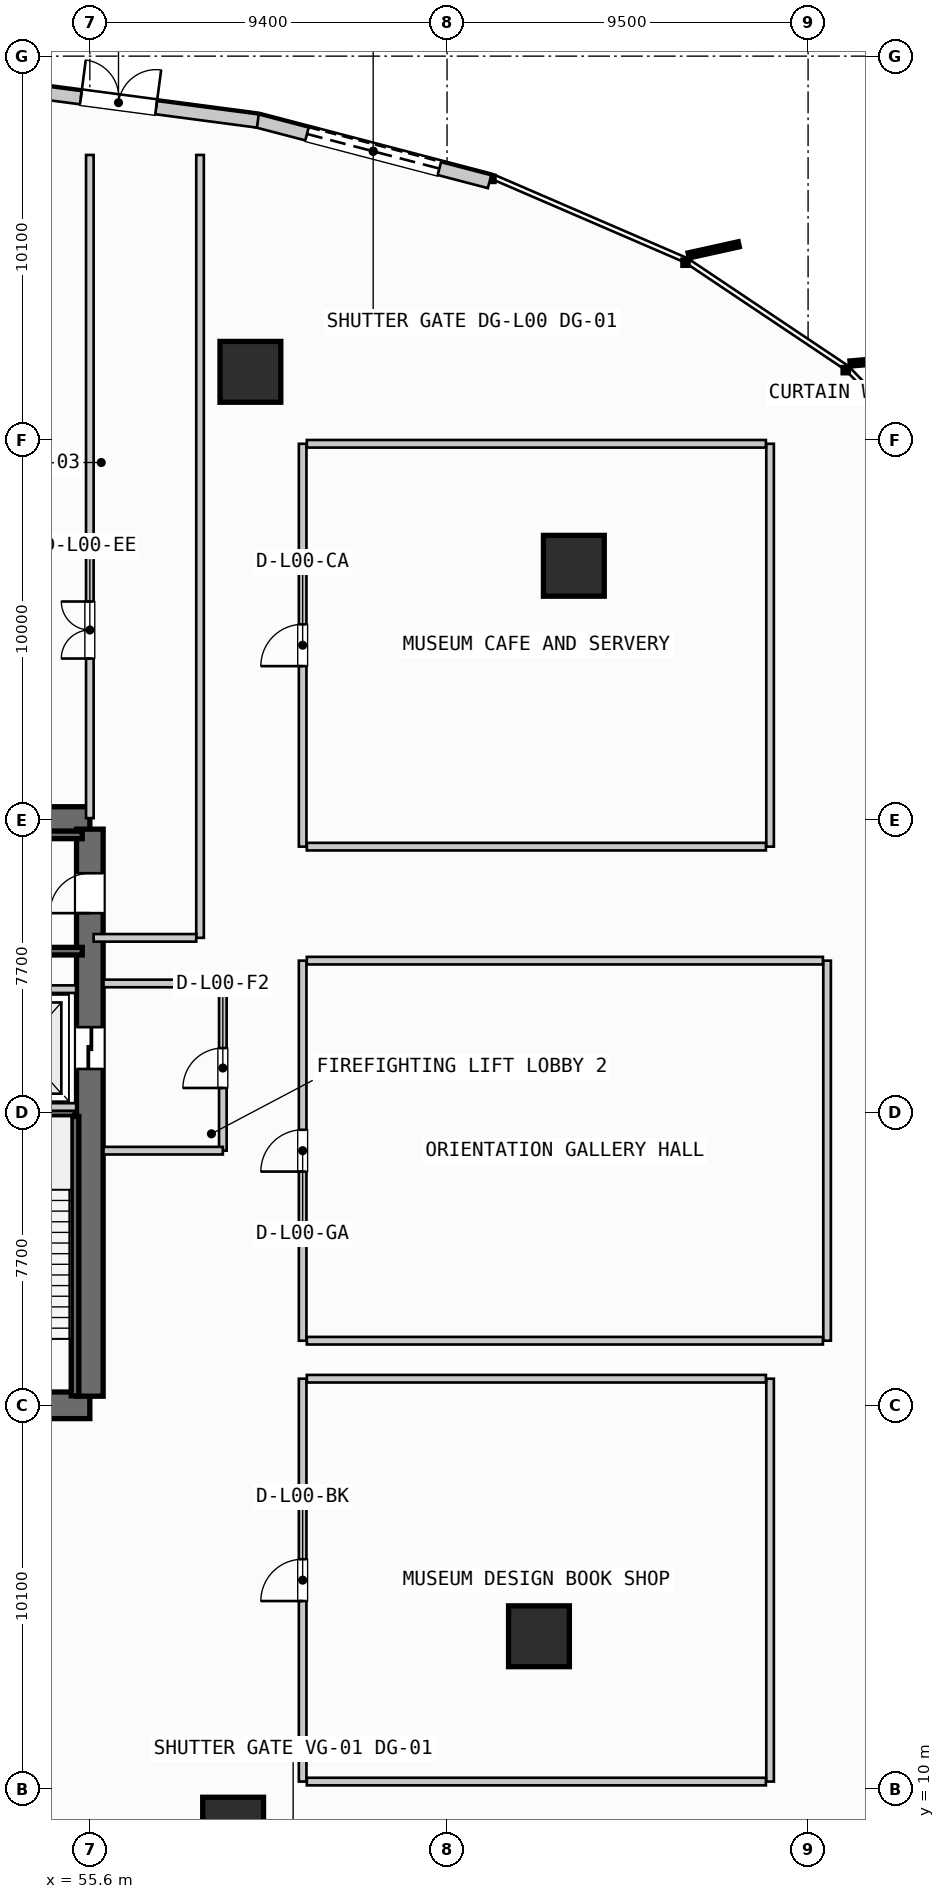
"""IFC4 building model, lengths in metres.
Left out: names, types, materials, properties, quantities, classifications, styles, units other than length and angle.
Written with IfcOpenShell. Run it as: python <this file> out.ifc"""

import sys

from ifc_helpers import new_model, si_unit, direction, frame, frame_2d, origin, origin_2d, place, context, subcontext, project, spatial, rectangle, hollow_rectangle, extrude, source, transform, mapped, element, fill, save


model = new_model("IFC4")
c1 = context("Model", 3, precision=1e-05, world=origin(), true_north=direction((0.0, 1.0)))
c2 = subcontext(c1, "Body", "Model", "MODEL_VIEW")
j1 = project(units=[si_unit("LENGTHUNIT", "METRE"), si_unit("PLANEANGLEUNIT", "RADIAN")], contexts=[c1])
p1 = place(None, origin())
s1 = spatial("IfcSite", under=j1, at=p1, CompositionType="ELEMENT")
p2 = place(p1, origin())
s2 = spatial("IfcBuilding", under=s1, at=p2, CompositionType="ELEMENT")
p3 = place(p2, origin())
s3 = spatial("IfcBuildingStorey", under=s2, at=p3, CompositionType="ELEMENT", Elevation=0.0)
p4 = place(p3, frame((38.0, 20.1, 0.0), z_axis=(0.0, 0.0, 1.0), x_axis=(1.0, 0.0, 0.0)))
e1 = element("IfcWall", 1, at=p4, inside=s3, PredefinedType="SHEAR", context=c2, shape_type="SweptSolid", body=[
    extrude(rectangle(XDim=17.6, YDim=0.7, at=frame_2d((8.8, 0.0))), origin(), (0.0, 0.0, 1.0), 4.95),
])
p5 = place(p4, frame((1.4, 0.0, 0.0)))
e2 = element("IfcOpeningElement", 2, at=p5, cuts=e1, PredefinedType="OPENING", context=c2, shape_type="SweptSolid", body=[
    extrude(rectangle(XDim=1.05, YDim=2.15, at=frame_2d((0.525, 1.075))), frame((0.0, 0.36, 0.0), z_axis=(0.0, -1.0, 0.0), x_axis=(1.0, 0.0, 0.0)), (0.0, 0.0, 1.0), 0.72),
])
p6 = place(p4, frame((15.15, 0.0, 0.0)))
e3 = element("IfcOpeningElement", 3, at=p6, cuts=e1, PredefinedType="OPENING", context=c2, shape_type="SweptSolid", body=[
    extrude(rectangle(XDim=1.05, YDim=2.15, at=frame_2d((0.525, 1.075))), frame((0.0, 0.36, 0.0), z_axis=(0.0, -1.0, 0.0), x_axis=(1.0, 0.0, 0.0)), (0.0, 0.0, 1.0), 0.72),
])
p7 = place(p3, frame((55.6, 35.5, 0.0), z_axis=(0.0, 0.0, 1.0), x_axis=(-1.0, 0.0, 0.0)))
e4 = element("IfcWall", 4, at=p7, inside=s3, PredefinedType="SHEAR", context=c2, shape_type="SweptSolid", body=[
    extrude(rectangle(XDim=17.6, YDim=0.7, at=frame_2d((8.8, 0.0))), origin(), (0.0, 0.0, 1.0), 4.95),
])
p8 = place(p7, frame((8.05, 0.0, 0.0)))
e5 = element("IfcOpeningElement", 5, at=p8, cuts=e4, PredefinedType="OPENING", context=c2, shape_type="SweptSolid", body=[
    extrude(rectangle(XDim=1.5, YDim=2.2, at=frame_2d((0.75, 1.1))), frame((0.0, 0.36, 0.0), z_axis=(0.0, -1.0, 0.0), x_axis=(1.0, 0.0, 0.0)), (0.0, 0.0, 1.0), 0.72),
])
p9 = place(p7, frame((14.95, 0.0, 0.0)))
e6 = element("IfcOpeningElement", 6, at=p9, cuts=e4, PredefinedType="OPENING", context=c2, shape_type="SweptSolid", body=[
    extrude(rectangle(XDim=1.4, YDim=2.3, at=frame_2d((0.7, 1.15))), frame((0.0, 0.36, 0.0), z_axis=(0.0, -1.0, 0.0), x_axis=(1.0, 0.0, 0.0)), (0.0, 0.0, 1.0), 0.72),
])
p10 = place(p7, frame((12.3, 0.0, 0.0)))
e7 = element("IfcOpeningElement", 7, at=p10, cuts=e4, PredefinedType="OPENING", context=c2, shape_type="SweptSolid", body=[
    extrude(rectangle(XDim=0.95, YDim=2.15, at=frame_2d((0.475, 1.075))), frame((0.0, 0.36, 0.0), z_axis=(0.0, -1.0, 0.0), x_axis=(1.0, 0.0, 0.0)), (0.0, 0.0, 1.0), 0.72),
])
p11 = place(p7, frame((10.2, 0.0, 0.0)))
e8 = element("IfcOpeningElement", 8, at=p11, cuts=e4, PredefinedType="OPENING", context=c2, shape_type="SweptSolid", body=[
    extrude(rectangle(XDim=0.9, YDim=2.15, at=frame_2d((0.45, 1.075))), frame((0.0, 0.36, 0.0), z_axis=(0.0, -1.0, 0.0), x_axis=(1.0, 0.0, 0.0)), (0.0, 0.0, 1.0), 0.72),
])
p12 = place(p3, frame((55.6, 20.34, 0.0), z_axis=(0.0, 0.0, 1.0), x_axis=(0.0, 1.0, 0.0)))
e9 = element("IfcWall", 9, at=p12, inside=s3, PredefinedType="SHEAR", context=c2, shape_type="SweptSolid", body=[
    extrude(rectangle(XDim=14.92, YDim=0.7, at=frame_2d((7.46, 0.0))), origin(), (0.0, 0.0, 1.0), 4.95),
])
p13 = place(p12, frame((12.71, 0.0, 0.0)))
e10 = element("IfcOpeningElement", 10, at=p13, cuts=e9, PredefinedType="OPENING", context=c2, shape_type="SweptSolid", body=[
    extrude(rectangle(XDim=1.05, YDim=2.15, at=frame_2d((0.525, 1.075))), frame((0.0, 0.36, 0.0), z_axis=(0.0, -1.0, 0.0), x_axis=(1.0, 0.0, 0.0)), (0.0, 0.0, 1.0), 0.72),
])
p14 = place(p12, frame((8.61, 0.0, 0.0)))
e11 = element("IfcOpeningElement", 11, at=p14, cuts=e9, PredefinedType="OPENING", context=c2, shape_type="SweptSolid", body=[
    extrude(rectangle(XDim=1.1, YDim=2.2, at=frame_2d((0.55, 1.1))), frame((0.0, 0.36, 0.0), z_axis=(0.0, -1.0, 0.0), x_axis=(1.0, 0.0, 0.0)), (0.0, 0.0, 1.0), 0.72),
])
m1 = source(origin(), c2, "Body", "SweptSolid", [
    extrude(hollow_rectangle(XDim=1.6, YDim=1.6, WallThickness=0.06, InnerFilletRadius=0.03, OuterFilletRadius=0.09, at=origin_2d()), origin(), (0.0, 0.0, 1.0), 4.95),
])
for number, where, z_axis, x_axis in (
    (12, (68.336, 42.19, 0.0), (0.0, 0.0, 1.0), (1.0, 0.0, 0.0)),
    (13, (59.825, 47.293, 0.0), (0.0, 0.0, 1.0), (1.0, 0.0, 0.0)),
    (14, (59.37, 8.987, 0.0), (0.0, 0.0, 1.0), (1.0, 0.0, 0.0)),
    (15, (67.418, 14.023, 0.0), (0.0, 0.0, 1.0), (1.0, 0.0, 0.0)),
):
    element("IfcColumn", number, at=place(p3, frame(where, z_axis=z_axis, x_axis=x_axis)), inside=s3, PredefinedType="COLUMN", context=c2, shape_type="MappedRepresentation", body=[
        mapped(m1, transform((0.0, 0.0, 0.0), scale=1.0)),
    ])
p15 = place(p3, frame((59.994, 53.898, 0.0), z_axis=(0.0, 0.0, 1.0), x_axis=(0.967458151093, -0.253031076914, 0.0)))
e16 = element("IfcWall", 16, at=p15, inside=s3, PredefinedType="SOLIDWALL", context=c2, shape_type="SweptSolid", body=[
    extrude(rectangle(XDim=6.33, YDim=0.35, at=frame_2d((3.165, 0.0))), origin(), (0.0, 0.0, 1.0), 4.95),
])
p16 = place(p15, frame((1.365, 0.0, 0.0)))
e17 = element("IfcOpeningElement", 17, at=p16, cuts=e16, PredefinedType="OPENING", context=c2, shape_type="SweptSolid", body=[
    extrude(rectangle(XDim=3.6, YDim=3.8, at=frame_2d((1.8, 1.9))), frame((0.0, 0.185, 0.0), z_axis=(0.0, -1.0, 0.0), x_axis=(1.0, 0.0, 0.0)), (0.0, 0.0, 1.0), 0.37),
])
p17 = place(p3, frame((52.687, 54.859, 0.0), z_axis=(0.0, 0.0, 1.0), x_axis=(0.991427089323, -0.130661113403, 0.0)))
e18 = element("IfcWall", 18, at=p17, inside=s3, PredefinedType="SOLIDWALL", context=c2, shape_type="SweptSolid", body=[
    extrude(rectangle(XDim=7.397, YDim=0.35, at=frame_2d((3.699, 0.0))), origin(), (0.0, 0.0, 1.0), 4.95),
])
p18 = place(p17, frame((2.699, 0.0, 0.0)))
e19 = element("IfcOpeningElement", 19, at=p18, cuts=e18, PredefinedType="OPENING", context=c2, shape_type="SweptSolid", body=[
    extrude(rectangle(XDim=2.0, YDim=2.4, at=frame_2d((1.0, 1.2))), frame((0.0, 0.185, 0.0), z_axis=(0.0, -1.0, 0.0), x_axis=(1.0, 0.0, 0.0)), (0.0, 0.0, 1.0), 0.37),
])
p19 = place(p3, frame((52.15, 27.8, 0.0), z_axis=(0.0, 0.0, 1.0), x_axis=(1.0, 0.0, 0.0)))
e20 = element("IfcWall", 20, at=p19, inside=s3, PredefinedType="SHEAR", context=c2, shape_type="SweptSolid", body=[
    extrude(rectangle(XDim=3.06, YDim=0.2, at=frame_2d((1.53, 0.0))), origin(), (0.0, 0.0, 1.0), 4.95),
])
for number, where, z_axis, x_axis in (
    (21, (55.21, 27.7, 0.0), (0.0, 0.0, 1.0), (0.0, -1.0, 0.0)),
    (22, (48.05, 35.11, 0.0), (0.0, 0.0, 1.0), (1.0, 0.0, 0.0)),
    (23, (55.4, 32.05, 0.0), (0.0, 0.0, 1.0), (-1.0, 0.0, 0.0)),
):
    element("IfcWall", number, at=place(p3, frame(where, z_axis=z_axis, x_axis=x_axis)), inside=s3, PredefinedType="SHEAR", context=c2, shape_type="SweptSolid", body=[
        extrude(rectangle(XDim=7.35, YDim=0.2, at=frame_2d((3.675, 0.0))), origin(), (0.0, 0.0, 1.0), 4.95),
    ])
for number, where, z_axis, x_axis in (
    (24, (52.45, 27.95, 0.0), (0.0, 0.0, 1.0), (1.0, 0.0, 0.0)),
    (25, (52.45, 31.05, 0.0), (0.0, 0.0, 1.0), (1.0, 0.0, 0.0)),
):
    element("IfcWall", number, at=place(p3, frame(where, z_axis=z_axis, x_axis=x_axis)), inside=s3, PredefinedType="PARTITIONING", context=c2, shape_type="SweptSolid", body=[
        extrude(rectangle(XDim=2.79, YDim=0.2, at=frame_2d((1.395, 0.0))), origin(), (0.0, 0.0, 1.0), 4.163),
    ])
p20 = place(p3, frame((59.1, 26.8, 0.0), z_axis=(0.0, 0.0, 1.0), x_axis=(0.0, 1.0, 0.0)))
e26 = element("IfcWall", 26, at=p20, inside=s3, PredefinedType="PARTITIONING", context=c2, shape_type="SweptSolid", body=[
    extrude(rectangle(XDim=4.4, YDim=0.2, at=frame_2d((2.2, 0.0))), origin(), (0.0, 0.0, 1.0), 4.163),
])
p21 = place(p20, frame((1.65, 0.0, 0.0)))
e27 = element("IfcOpeningElement", 27, at=p21, cuts=e26, PredefinedType="OPENING", context=c2, shape_type="SweptSolid", body=[
    extrude(rectangle(XDim=1.05, YDim=2.15, at=frame_2d((0.525, 1.075))), frame((0.0, 0.11, 0.0), z_axis=(0.0, -1.0, 0.0), x_axis=(1.0, 0.0, 0.0)), (0.0, 0.0, 1.0), 0.22),
])
for number, where, z_axis, x_axis in (
    (28, (55.96, 26.8, 0.0), (0.0, 0.0, 1.0), (1.0, 0.0, 0.0)),
    (29, (55.96, 31.2, 0.0), (0.0, 0.0, 1.0), (1.0, 0.0, 0.0)),
):
    element("IfcWall", number, at=place(p3, frame(where, z_axis=z_axis, x_axis=x_axis)), inside=s3, PredefinedType="PARTITIONING", context=c2, shape_type="SweptSolid", body=[
        extrude(rectangle(XDim=3.14, YDim=0.2, at=frame_2d((1.57, 0.0))), origin(), (0.0, 0.0, 1.0), 4.163),
    ])
p22 = place(p3, frame((61.2, 10.2, 0.0), z_axis=(0.0, 0.0, 1.0), x_axis=(0.0, 1.0, 0.0)))
e30 = element("IfcWall", 30, at=p22, inside=s3, PredefinedType="PARTITIONING", context=c2, shape_type="SweptSolid", body=[
    extrude(rectangle(XDim=10.6, YDim=0.2, at=frame_2d((5.3, 0.0))), origin(), (0.0, 0.0, 1.0), 4.163),
])
p23 = place(p22, frame((4.75, 0.0, 0.0)))
e31 = element("IfcOpeningElement", 31, at=p23, cuts=e30, PredefinedType="OPENING", context=c2, shape_type="SweptSolid", body=[
    extrude(rectangle(XDim=1.1, YDim=2.15, at=frame_2d((0.55, 1.075))), frame((0.0, 0.11, 0.0), z_axis=(0.0, -1.0, 0.0), x_axis=(1.0, 0.0, 0.0)), (0.0, 0.0, 1.0), 0.22),
])
p24 = place(p3, frame((73.5, 10.2, 0.0), z_axis=(0.0, 0.0, 1.0), x_axis=(0.0, 1.0, 0.0)))
e32 = element("IfcWall", 32, at=p24, inside=s3, PredefinedType="PARTITIONING", context=c2, shape_type="SweptSolid", body=[
    extrude(rectangle(XDim=10.6, YDim=0.2, at=frame_2d((5.3, 0.0))), origin(), (0.0, 0.0, 1.0), 4.163),
])
for number, where, z_axis, x_axis in (
    (33, (61.31, 10.2, 0.0), (0.0, 0.0, 1.0), (1.0, 0.0, 0.0)),
    (34, (61.31, 20.8, 0.0), (0.0, 0.0, 1.0), (1.0, 0.0, 0.0)),
):
    element("IfcWall", number, at=place(p3, frame(where, z_axis=z_axis, x_axis=x_axis)), inside=s3, PredefinedType="PARTITIONING", context=c2, shape_type="SweptSolid", body=[
        extrude(rectangle(XDim=12.08, YDim=0.2, at=frame_2d((6.04, 0.0))), origin(), (0.0, 0.0, 1.0), 4.163),
    ])
p25 = place(p3, frame((61.2, 34.8, 0.0), z_axis=(0.0, 0.0, 1.0), x_axis=(0.0, 1.0, 0.0)))
e35 = element("IfcWall", 35, at=p25, inside=s3, PredefinedType="PARTITIONING", context=c2, shape_type="SweptSolid", body=[
    extrude(rectangle(XDim=10.6, YDim=0.2, at=frame_2d((5.3, 0.0))), origin(), (0.0, 0.0, 1.0), 4.163),
])
p26 = place(p25, frame((4.75, 0.0, 0.0)))
e36 = element("IfcOpeningElement", 36, at=p26, cuts=e35, PredefinedType="OPENING", context=c2, shape_type="SweptSolid", body=[
    extrude(rectangle(XDim=1.1, YDim=2.15, at=frame_2d((0.55, 1.075))), frame((0.0, 0.11, 0.0), z_axis=(0.0, -1.0, 0.0), x_axis=(1.0, 0.0, 0.0)), (0.0, 0.0, 1.0), 0.22),
])
p27 = place(p3, frame((73.5, 34.8, 0.0), z_axis=(0.0, 0.0, 1.0), x_axis=(0.0, 1.0, 0.0)))
e37 = element("IfcWall", 37, at=p27, inside=s3, PredefinedType="PARTITIONING", context=c2, shape_type="SweptSolid", body=[
    extrude(rectangle(XDim=10.6, YDim=0.2, at=frame_2d((5.3, 0.0))), origin(), (0.0, 0.0, 1.0), 3.405),
])
p28 = place(p3, frame((61.31, 34.8, 0.0), z_axis=(0.0, 0.0, 1.0), x_axis=(1.0, 0.0, 0.0)))
e38 = element("IfcWall", 38, at=p28, inside=s3, PredefinedType="PARTITIONING", context=c2, shape_type="SweptSolid", body=[
    extrude(rectangle(XDim=12.08, YDim=0.2, at=frame_2d((6.04, 0.0))), origin(), (0.0, 0.0, 1.0), 4.163),
])
p29 = place(p3, frame((61.31, 45.4, 0.0), z_axis=(0.0, 0.0, 1.0), x_axis=(1.0, 0.0, 0.0)))
e39 = element("IfcWall", 39, at=p29, inside=s3, PredefinedType="PARTITIONING", context=c2, shape_type="SweptSolid", body=[
    extrude(rectangle(XDim=12.08, YDim=0.2, at=frame_2d((6.04, 0.0))), origin(), (0.0, 0.0, 1.0), 3.405),
])
p30 = place(p3, frame((61.2, 21.8, 0.0), z_axis=(0.0, 0.0, 1.0), x_axis=(0.0, 1.0, 0.0)))
e40 = element("IfcWall", 40, at=p30, inside=s3, PredefinedType="PARTITIONING", context=c2, shape_type="SweptSolid", body=[
    extrude(rectangle(XDim=10.0, YDim=0.2, at=frame_2d((5.0, 0.0))), origin(), (0.0, 0.0, 1.0), 4.163),
])
p31 = place(p30, frame((4.45, 0.0, 0.0)))
e41 = element("IfcOpeningElement", 41, at=p31, cuts=e40, PredefinedType="OPENING", context=c2, shape_type="SweptSolid", body=[
    extrude(rectangle(XDim=1.1, YDim=2.15, at=frame_2d((0.55, 1.075))), frame((0.0, 0.11, 0.0), z_axis=(0.0, -1.0, 0.0), x_axis=(1.0, 0.0, 0.0)), (0.0, 0.0, 1.0), 0.22),
])
p32 = place(p3, frame((75.0, 21.8, 0.0), z_axis=(0.0, 0.0, 1.0), x_axis=(0.0, 1.0, 0.0)))
e42 = element("IfcWall", 42, at=p32, inside=s3, PredefinedType="PARTITIONING", context=c2, shape_type="SweptSolid", body=[
    extrude(rectangle(XDim=10.0, YDim=0.2, at=frame_2d((5.0, 0.0))), origin(), (0.0, 0.0, 1.0), 4.163),
])
for number, where, z_axis, x_axis in (
    (43, (61.31, 21.8, 0.0), (0.0, 0.0, 1.0), (1.0, 0.0, 0.0)),
    (44, (61.31, 31.8, 0.0), (0.0, 0.0, 1.0), (1.0, 0.0, 0.0)),
):
    element("IfcWall", number, at=place(p3, frame(where, z_axis=z_axis, x_axis=x_axis)), inside=s3, PredefinedType="PARTITIONING", context=c2, shape_type="SweptSolid", body=[
        extrude(rectangle(XDim=13.58, YDim=0.2, at=frame_2d((6.79, 0.0))), origin(), (0.0, 0.0, 1.0), 4.163),
    ])
p33 = place(p3, frame((58.5, 32.4, 0.0), z_axis=(0.0, 0.0, 1.0), x_axis=(0.0, 1.0, 0.0)))
e45 = element("IfcWall", 45, at=p33, inside=s3, PredefinedType="PARTITIONING", context=c2, shape_type="SweptSolid", body=[
    extrude(rectangle(XDim=20.6, YDim=0.2, at=frame_2d((10.3, 0.0))), origin(), (0.0, 0.0, 1.0), 3.405),
])
p34 = place(p3, frame((55.7, 32.4, 0.0), z_axis=(0.0, 0.0, 1.0), x_axis=(1.0, 0.0, 0.0)))
e46 = element("IfcWall", 46, at=p34, inside=s3, PredefinedType="PARTITIONING", context=c2, shape_type="SweptSolid", body=[
    extrude(rectangle(XDim=2.7, YDim=0.2, at=frame_2d((1.35, 0.0))), origin(), (0.0, 0.0, 1.0), 4.163),
])
p35 = place(p3, frame((55.6, 35.55, 0.0), z_axis=(0.0, 0.0, 1.0), x_axis=(0.0, 1.0, 0.0)))
e47 = element("IfcWall", 47, at=p35, inside=s3, PredefinedType="PARTITIONING", context=c2, shape_type="SweptSolid", body=[
    extrude(rectangle(XDim=17.45, YDim=0.2, at=frame_2d((8.725, 0.0))), origin(), (0.0, 0.0, 1.0), 3.405),
])
p36 = place(p35, frame((4.2, 0.0, 0.0)))
e48 = element("IfcOpeningElement", 48, at=p36, cuts=e47, PredefinedType="OPENING", context=c2, shape_type="SweptSolid", body=[
    extrude(rectangle(XDim=1.5, YDim=2.2, at=frame_2d((0.75, 1.1))), frame((0.0, 0.11, 0.0), z_axis=(0.0, -1.0, 0.0), x_axis=(1.0, 0.0, 0.0)), (0.0, 0.0, 1.0), 0.22),
])
m2 = source(origin(), c2, "Body", "SweptSolid", [
    extrude(rectangle(XDim=3.6, YDim=3.8, at=frame_2d((1.8, 1.9))), frame((0.0, 0.025, 0.0), z_axis=(0.0, -1.0, 0.0), x_axis=(1.0, 0.0, 0.0)), (0.0, 0.0, 1.0), 0.05),
])
p37 = place(p16, origin())
e49 = element("IfcDoor", 49, at=p37, inside=s3, OperationType="ROLLINGUP", PredefinedType="GATE", context=c2, shape_type="MappedRepresentation", body=[
    mapped(m2, transform((0.0, 0.0, 0.0), scale=1.0)),
])
fill(e17, e49)
m3 = source(origin(), c2, "Body", "SweptSolid", [
    extrude(rectangle(XDim=2.0, YDim=2.4, at=frame_2d((1.0, 1.2))), frame((0.0, 0.025, 0.0), z_axis=(0.0, -1.0, 0.0), x_axis=(1.0, 0.0, 0.0)), (0.0, 0.0, 1.0), 0.05),
])
p38 = place(p18, origin())
e50 = element("IfcDoor", 50, at=p38, inside=s3, OperationType="DOUBLE_DOOR_SINGLE_SWING", PredefinedType="DOOR", context=c2, shape_type="MappedRepresentation", body=[
    mapped(m3, transform((0.0, 0.0, 0.0), scale=1.0)),
])
fill(e19, e50)
m4 = source(origin(), c2, "Body", "SweptSolid", [
    extrude(rectangle(XDim=1.05, YDim=2.15, at=frame_2d((0.525, 1.075))), frame((0.0, 0.025, 0.0), z_axis=(0.0, -1.0, 0.0), x_axis=(1.0, 0.0, 0.0)), (0.0, 0.0, 1.0), 0.05),
])
p39 = place(p13, origin())
e51 = element("IfcDoor", 51, at=p39, inside=s3, OperationType="SINGLE_SWING_LEFT", PredefinedType="DOOR", context=c2, shape_type="MappedRepresentation", body=[
    mapped(m4, transform((0.0, 0.0, 0.0), scale=1.0)),
])
fill(e10, e51)
m5 = source(origin(), c2, "Body", "SweptSolid", [
    extrude(rectangle(XDim=1.1, YDim=2.2, at=frame_2d((0.55, 1.1))), frame((0.0, 0.025, 0.0), z_axis=(0.0, -1.0, 0.0), x_axis=(1.0, 0.0, 0.0)), (0.0, 0.0, 1.0), 0.05),
])
p40 = place(p14, origin())
e52 = element("IfcDoor", 52, at=p40, inside=s3, OperationType="SLIDING_TO_RIGHT", PredefinedType="DOOR", context=c2, shape_type="MappedRepresentation", body=[
    mapped(m5, transform((0.0, 0.0, 0.0), scale=1.0)),
])
fill(e11, e52)
p41 = place(p21, origin())
e53 = element("IfcDoor", 53, at=p41, inside=s3, OperationType="SINGLE_SWING_LEFT", PredefinedType="DOOR", context=c2, shape_type="MappedRepresentation", body=[
    mapped(m4, transform((0.0, 0.0, 0.0), scale=1.0)),
])
fill(e27, e53)
m6 = source(origin(), c2, "Body", "SweptSolid", [
    extrude(rectangle(XDim=1.1, YDim=2.15, at=frame_2d((0.55, 1.075))), frame((0.0, 0.025, 0.0), z_axis=(0.0, -1.0, 0.0), x_axis=(1.0, 0.0, 0.0)), (0.0, 0.0, 1.0), 0.05),
])
p42 = place(p23, origin())
e54 = element("IfcDoor", 54, at=p42, inside=s3, OperationType="SINGLE_SWING_LEFT", PredefinedType="DOOR", context=c2, shape_type="MappedRepresentation", body=[
    mapped(m6, transform((0.0, 0.0, 0.0), scale=1.0)),
])
fill(e31, e54)
p43 = place(p26, origin())
e55 = element("IfcDoor", 55, at=p43, inside=s3, OperationType="SINGLE_SWING_LEFT", PredefinedType="DOOR", context=c2, shape_type="MappedRepresentation", body=[
    mapped(m6, transform((0.0, 0.0, 0.0), scale=1.0)),
])
fill(e36, e55)
p44 = place(p31, origin())
e56 = element("IfcDoor", 56, at=p44, inside=s3, OperationType="SINGLE_SWING_LEFT", PredefinedType="DOOR", context=c2, shape_type="MappedRepresentation", body=[
    mapped(m6, transform((0.0, 0.0, 0.0), scale=1.0)),
])
fill(e41, e56)
m7 = source(origin(), c2, "Body", "SweptSolid", [
    extrude(rectangle(XDim=1.5, YDim=2.2, at=frame_2d((0.75, 1.1))), frame((0.0, 0.025, 0.0), z_axis=(0.0, -1.0, 0.0), x_axis=(1.0, 0.0, 0.0)), (0.0, 0.0, 1.0), 0.05),
])
p45 = place(p36, origin())
e57 = element("IfcDoor", 57, at=p45, inside=s3, OperationType="DOUBLE_DOOR_SINGLE_SWING", PredefinedType="DOOR", context=c2, shape_type="MappedRepresentation", body=[
    mapped(m7, transform((0.0, 0.0, 0.0), scale=1.0)),
])
fill(e48, e57)
save(model, sys.argv[1])
